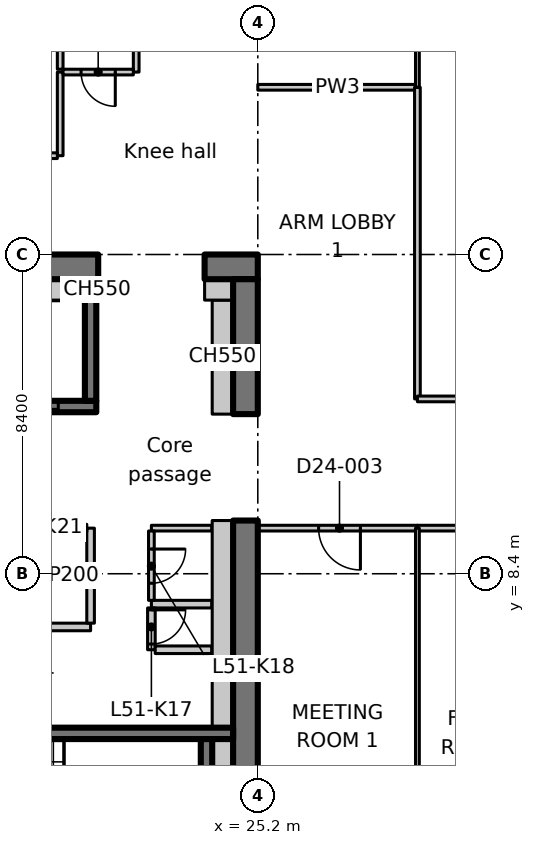
"""IFC4 building model, lengths in metres.
Left out: names, types, materials, properties, quantities, classifications, styles, units other than length and angle.
Written with IfcOpenShell. Run it as: python <this file> out.ifc"""

import sys

from ifc_helpers import new_model, si_unit, direction, frame, frame_2d, origin, place, context, subcontext, project, spatial, polyline, rectangle, outline, extrude, element, fill, save


model = new_model("IFC4")
c1 = context("Model", 3, precision=1e-05, world=origin(), true_north=direction((0.0, 1.0)))
c2 = subcontext(c1, "Body", "Model", "MODEL_VIEW")
j1 = project(units=[si_unit("LENGTHUNIT", "METRE"), si_unit("PLANEANGLEUNIT", "RADIAN")], contexts=[c1])
p1 = place(None, origin())
s1 = spatial("IfcSite", under=j1, at=p1, CompositionType="ELEMENT")
p2 = place(p1, origin())
s2 = spatial("IfcBuilding", under=s1, at=p2, CompositionType="ELEMENT")
p3 = place(p2, frame((0.0, 0.0, 202.8)))
s3 = spatial("IfcBuildingStorey", under=s2, at=p3, CompositionType="ELEMENT", Elevation=202.8)
p4 = place(p3, frame((-1.1, 16.475, 0.0), z_axis=(0.0, 0.0, 1.0), x_axis=(1.0, 0.0, 0.0)))
e1 = element("IfcWall", 1, at=p4, inside=s3, PredefinedType="SHEAR", context=c2, shape_type="SweptSolid", body=[
    extrude(rectangle(XDim=22.1, YDim=0.65, at=frame_2d((11.05, 0.0))), origin(), (0.0, 0.0, 1.0), 3.3),
])
p5 = place(p4, frame((3.15, 0.0, 0.0)))
e2 = element("IfcOpeningElement", 2, at=p5, cuts=e1, PredefinedType="OPENING", context=c2, shape_type="SweptSolid", body=[
    extrude(rectangle(XDim=1.1, YDim=2.3, at=frame_2d((0.55, 1.15))), frame((0.0, 0.335, 0.0), z_axis=(0.0, -1.0, 0.0), x_axis=(1.0, 0.0, 0.0)), (0.0, 0.0, 1.0), 0.67),
])
p6 = place(p3, frame((23.8, 16.475, 0.0), z_axis=(0.0, 0.0, 1.0), x_axis=(1.0, 0.0, 0.0)))
e3 = element("IfcWall", 3, at=p6, inside=s3, PredefinedType="SHEAR", context=c2, shape_type="SweptSolid", body=[
    extrude(rectangle(XDim=1.4, YDim=0.65, at=frame_2d((0.7, 0.0))), origin(), (0.0, 0.0, 1.0), 3.3),
])
p7 = place(p3, frame((24.875, 0.65, 0.0), z_axis=(0.0, 0.0, 1.0), x_axis=(0.0, 1.0, 0.0)))
e4 = element("IfcWall", 4, at=p7, inside=s3, PredefinedType="SHEAR", context=c2, shape_type="SweptSolid", body=[
    extrude(rectangle(XDim=9.15, YDim=0.65, at=frame_2d((4.575, 0.0))), origin(), (0.0, 0.0, 1.0), 3.3),
])
p8 = place(p3, frame((24.875, 12.6, 0.0), z_axis=(0.0, 0.0, 1.0), x_axis=(0.0, 1.0, 0.0)))
e5 = element("IfcWall", 5, at=p8, inside=s3, PredefinedType="SHEAR", context=c2, shape_type="SweptSolid", body=[
    extrude(rectangle(XDim=3.55, YDim=0.65, at=frame_2d((1.775, 0.0))), origin(), (0.0, 0.0, 1.0), 3.3),
])
p9 = place(p3, frame((24.275, 12.6, 0.0), z_axis=(0.0, 0.0, 1.0), x_axis=(0.0, 1.0, 0.0)))
e6 = element("IfcWall", 6, at=p9, inside=s3, PredefinedType="PARTITIONING", context=c2, shape_type="SweptSolid", body=[
    extrude(rectangle(XDim=3.0, YDim=0.55, at=frame_2d((1.5, 0.0))), origin(), (0.0, 0.0, 1.0), 3.3),
])
p10 = place(p3, frame((23.8, 15.875, 0.0), z_axis=(0.0, 0.0, 1.0), x_axis=(1.0, 0.0, 0.0)))
e7 = element("IfcWall", 7, at=p10, inside=s3, PredefinedType="PARTITIONING", context=c2, shape_type="SweptSolid", body=[
    extrude(rectangle(XDim=0.75, YDim=0.55, at=frame_2d((0.375, 0.0))), origin(), (0.0, 0.0, 1.0), 3.3),
])
p11 = place(p3, frame((17.85, 12.8, 0.0), z_axis=(0.0, 0.0, 1.0), x_axis=(1.0, 0.0, 0.0)))
e8 = element("IfcWall", 8, at=p11, inside=s3, PredefinedType="SHEAR", context=c2, shape_type="SweptSolid", body=[
    extrude(rectangle(XDim=3.1, YDim=0.3, at=frame_2d((1.55, 0.0))), origin(), (0.0, 0.0, 1.0), 3.3),
])
p12 = place(p11, frame((1.0, 0.0, 0.0)))
e9 = element("IfcOpeningElement", 9, at=p12, cuts=e8, PredefinedType="OPENING", context=c2, shape_type="SweptSolid", body=[
    extrude(rectangle(XDim=1.1, YDim=2.3, at=frame_2d((0.55, 1.15))), frame((0.0, 0.16, 0.0), z_axis=(0.0, -1.0, 0.0), x_axis=(1.0, 0.0, 0.0)), (0.0, 0.0, 1.0), 0.32),
])
p13 = place(p3, frame((20.8, 12.95, 0.0), z_axis=(0.0, 0.0, 1.0), x_axis=(0.0, 1.0, 0.0)))
e10 = element("IfcWall", 10, at=p13, inside=s3, PredefinedType="SHEAR", context=c2, shape_type="SweptSolid", body=[
    extrude(rectangle(XDim=3.2, YDim=0.3, at=frame_2d((1.6, 0.0))), origin(), (0.0, 0.0, 1.0), 3.3),
])
p14 = place(p3, frame((15.8, 4.2, 0.0), z_axis=(0.0, 0.0, 1.0), x_axis=(1.0, 0.0, 0.0)))
e11 = element("IfcWall", 11, at=p14, inside=s3, PredefinedType="SHEAR", context=c2, shape_type="SweptSolid", body=[
    extrude(rectangle(XDim=8.75, YDim=0.3, at=frame_2d((4.375, 0.0))), origin(), (0.0, 0.0, 1.0), 3.3),
])
p15 = place(p14, frame((0.4, 0.0, 0.0)))
e12 = element("IfcOpeningElement", 12, at=p15, cuts=e11, PredefinedType="OPENING", context=c2, shape_type="SweptSolid", body=[
    extrude(rectangle(XDim=1.0, YDim=2.1, at=frame_2d((0.5, 1.05))), frame((0.0, 0.16, 0.0), z_axis=(0.0, -1.0, 0.0), x_axis=(1.0, 0.0, 0.0)), (0.0, 0.0, 1.0), 0.32),
])
p16 = place(p3, frame((23.85, 1.5, 0.0), z_axis=(0.0, 0.0, 1.0), x_axis=(0.0, 1.0, 0.0)))
e13 = element("IfcWall", 13, at=p16, inside=s3, PredefinedType="SHEAR", context=c2, shape_type="SweptSolid", body=[
    extrude(rectangle(XDim=2.55, YDim=0.3, at=frame_2d((1.275, 0.0))), origin(), (0.0, 0.0, 1.0), 3.3),
])
p17 = place(p3, frame((12.4, 7.0, 0.0), z_axis=(0.0, 0.0, 1.0), x_axis=(1.0, 0.0, 0.0)))
e14 = element("IfcWall", 14, at=p17, inside=s3, PredefinedType="PARTITIONING", context=c2, shape_type="SweptSolid", body=[
    extrude(rectangle(XDim=8.4, YDim=0.2, at=frame_2d((4.2, 0.0))), origin(), (0.0, 0.0, 1.0), 3.3),
])
p18 = place(p3, frame((20.8, 7.1, 0.0), z_axis=(0.0, 0.0, 1.0), x_axis=(0.0, 1.0, 0.0)))
e15 = element("IfcWall", 15, at=p18, inside=s3, PredefinedType="PARTITIONING", context=c2, shape_type="SweptSolid", body=[
    extrude(rectangle(XDim=2.5, YDim=0.2, at=frame_2d((1.25, 0.0))), origin(), (0.0, 0.0, 1.0), 3.3),
])
p19 = place(p3, frame((20.7, 9.6, 0.0), z_axis=(0.0, 0.0, 1.0), x_axis=(-1.0, 0.0, 0.0)))
e16 = element("IfcWall", 16, at=p19, inside=s3, PredefinedType="PARTITIONING", context=c2, shape_type="SweptSolid", body=[
    extrude(rectangle(XDim=8.3, YDim=0.2, at=frame_2d((4.15, 0.0))), origin(), (0.0, 0.0, 1.0), 3.3),
])
p20 = place(p19, frame((3.65, 0.0, 0.0)))
e17 = element("IfcOpeningElement", 17, at=p20, cuts=e16, PredefinedType="OPENING", context=c2, shape_type="SweptSolid", body=[
    extrude(rectangle(XDim=0.9, YDim=2.1, at=frame_2d((0.45, 1.05))), frame((0.0, 0.11, 0.0), z_axis=(0.0, -1.0, 0.0), x_axis=(1.0, 0.0, 0.0)), (0.0, 0.0, 1.0), 0.22),
])
p21 = place(p3, frame((23.988, 7.6, 0.0), z_axis=(0.0, 0.0, 1.0), x_axis=(-1.0, 0.0, 0.0)))
e18 = element("IfcWall", 18, at=p21, inside=s3, PredefinedType="PARTITIONING", context=c2, shape_type="SweptSolid", body=[
    extrude(rectangle(XDim=1.588, YDim=0.2, at=frame_2d((0.794, 0.0))), origin(), (0.0, 0.0, 1.0), 3.3),
])
p22 = place(p3, frame((22.4, 7.5, 0.0), z_axis=(0.0, 0.0, 1.0), x_axis=(0.0, -1.0, 0.0)))
e19 = element("IfcWall", 19, at=p22, inside=s3, PredefinedType="PARTITIONING", context=c2, shape_type="SweptSolid", body=[
    extrude(rectangle(XDim=1.1, YDim=0.2, at=frame_2d((0.55, 0.0))), origin(), (0.0, 0.0, 1.0), 3.3),
])
p23 = place(p22, frame((0.05, 0.0, 0.0)))
e20 = element("IfcOpeningElement", 20, at=p23, cuts=e19, PredefinedType="OPENING", context=c2, shape_type="SweptSolid", body=[
    extrude(rectangle(XDim=0.9, YDim=2.1, at=frame_2d((0.45, 1.05))), frame((0.0, 0.11, 0.0), z_axis=(0.0, -1.0, 0.0), x_axis=(1.0, 0.0, 0.0)), (0.0, 0.0, 1.0), 0.22),
])
p24 = place(p3, frame((22.5, 6.4, 0.0), z_axis=(0.0, 0.0, 1.0), x_axis=(1.0, 0.0, 0.0)))
e21 = element("IfcWall", 21, at=p24, inside=s3, PredefinedType="PARTITIONING", context=c2, shape_type="SweptSolid", body=[
    extrude(rectangle(XDim=1.488, YDim=0.2, at=frame_2d((0.744, 0.0))), origin(), (0.0, 0.0, 1.0), 3.3),
])
p25 = place(p3, frame((20.0, 21.6, 0.0), z_axis=(0.0, 0.0, 1.0), x_axis=(0.0, -1.0, 0.0)))
e22 = element("IfcWall", 22, at=p25, inside=s3, PredefinedType="PARTITIONING", context=c2, shape_type="SweptSolid", body=[
    extrude(rectangle(XDim=2.2, YDim=0.15, at=frame_2d((1.1, 0.0))), origin(), (0.0, 0.0, 1.0), 3.3),
])
p26 = place(p3, frame((19.925, 19.4, 0.0), z_axis=(0.0, 0.0, 1.0), x_axis=(-1.0, 0.0, 0.0)))
e23 = element("IfcWall", 23, at=p26, inside=s3, PredefinedType="PARTITIONING", context=c2, shape_type="SweptSolid", body=[
    extrude(rectangle(XDim=3.725, YDim=0.15, at=frame_2d((1.863, 0.0))), origin(), (0.0, 0.0, 1.0), 3.3),
])
p27 = place(p26, frame((1.325, 0.0, 0.0)))
e24 = element("IfcOpeningElement", 24, at=p27, cuts=e23, PredefinedType="OPENING", context=c2, shape_type="SweptSolid", body=[
    extrude(rectangle(XDim=1.0, YDim=2.1, at=frame_2d((0.5, 1.05))), frame((0.0, 0.085, 0.0), z_axis=(0.0, -1.0, 0.0), x_axis=(1.0, 0.0, 0.0)), (0.0, 0.0, 1.0), 0.17),
])
p28 = place(p3, frame((22.0, 23.925, 0.0), z_axis=(0.0, 0.0, 1.0), x_axis=(0.0, -1.0, 0.0)))
e25 = element("IfcWall", 25, at=p28, inside=s3, PredefinedType="PARTITIONING", context=c2, shape_type="SweptSolid", body=[
    extrude(rectangle(XDim=2.325, YDim=0.15, at=frame_2d((1.163, 0.0))), origin(), (0.0, 0.0, 1.0), 3.3),
])
p29 = place(p3, frame((21.925, 21.6, 0.0), z_axis=(0.0, 0.0, 1.0), x_axis=(-1.0, 0.0, 0.0)))
e26 = element("IfcWall", 26, at=p29, inside=s3, PredefinedType="PARTITIONING", context=c2, shape_type="SweptSolid", body=[
    extrude(rectangle(XDim=1.85, YDim=0.15, at=frame_2d((0.925, 0.0))), origin(), (0.0, 0.0, 1.0), 3.3),
])
p30 = place(p29, frame((0.475, 0.0, 0.0)))
e27 = element("IfcOpeningElement", 27, at=p30, cuts=e26, PredefinedType="OPENING", context=c2, shape_type="SweptSolid", body=[
    extrude(rectangle(XDim=0.9, YDim=2.1, at=frame_2d((0.45, 1.05))), frame((0.0, 0.085, 0.0), z_axis=(0.0, -1.0, 0.0), x_axis=(1.0, 0.0, 0.0)), (0.0, 0.0, 1.0), 0.17),
])
p31 = place(p3, frame((20.0, 21.675, 0.0), z_axis=(0.0, 0.0, 1.0), x_axis=(0.0, 1.0, 0.0)))
e28 = element("IfcWall", 28, at=p31, inside=s3, PredefinedType="PARTITIONING", context=c2, shape_type="SweptSolid", body=[
    extrude(rectangle(XDim=2.15, YDim=0.15, at=frame_2d((1.075, 0.0))), origin(), (0.0, 0.0, 1.0), 3.3),
])
p32 = place(p3, frame((23.988, 9.6, 0.0), z_axis=(0.0, 0.0, 1.0), x_axis=(-1.0, 0.0, 0.0)))
e29 = element("IfcWall", 29, at=p32, inside=s3, PredefinedType="PARTITIONING", context=c2, shape_type="SweptSolid", body=[
    extrude(rectangle(XDim=1.588, YDim=0.15, at=frame_2d((0.794, 0.0))), origin(), (0.0, 0.0, 1.0), 3.3),
])
p33 = place(p3, frame((22.4, 9.525, 0.0), z_axis=(0.0, 0.0, 1.0), x_axis=(0.0, -1.0, 0.0)))
e30 = element("IfcWall", 30, at=p33, inside=s3, PredefinedType="PARTITIONING", context=c2, shape_type="SweptSolid", body=[
    extrude(rectangle(XDim=1.825, YDim=0.15, at=frame_2d((0.913, 0.0))), origin(), (0.0, 0.0, 1.0), 3.3),
])
p34 = place(p33, frame((0.475, 0.0, 0.0)))
e31 = element("IfcOpeningElement", 31, at=p34, cuts=e30, PredefinedType="OPENING", context=c2, shape_type="SweptSolid", body=[
    extrude(rectangle(XDim=0.9, YDim=2.1, at=frame_2d((0.45, 1.05))), frame((0.0, 0.085, 0.0), z_axis=(0.0, -1.0, 0.0), x_axis=(1.0, 0.0, 0.0)), (0.0, 0.0, 1.0), 0.17),
])
p35 = place(p3, frame((18.15, 15.875, 0.0), z_axis=(0.0, 0.0, 1.0), x_axis=(1.0, 0.0, 0.0)))
e32 = element("IfcWall", 32, at=p35, inside=s3, PredefinedType="PARTITIONING", context=c2, shape_type="SweptSolid", body=[
    extrude(rectangle(XDim=2.5, YDim=0.55, at=frame_2d((1.25, 0.0))), origin(), (0.0, 0.0, 1.0), 3.3),
])
p36 = place(p3, frame((20.95, 15.875, 0.0), z_axis=(0.0, 0.0, 1.0), x_axis=(1.0, 0.0, 0.0)))
e33 = element("IfcWall", 33, at=p36, inside=s3, PredefinedType="PARTITIONING", context=c2, shape_type="SweptSolid", body=[
    extrude(rectangle(XDim=0.05, YDim=0.55, at=frame_2d((0.025, 0.0))), origin(), (0.0, 0.0, 1.0), 3.3),
])
p37 = place(p3, frame((24.275, 1.5, 0.0), z_axis=(0.0, 0.0, 1.0), x_axis=(0.0, 1.0, 0.0)))
e34 = element("IfcWall", 34, at=p37, inside=s3, PredefinedType="PARTITIONING", context=c2, shape_type="SweptSolid", body=[
    extrude(rectangle(XDim=2.55, YDim=0.55, at=frame_2d((1.275, 0.0))), origin(), (0.0, 0.0, 1.0), 3.3),
])
p38 = place(p3, frame((24.275, 4.35, 0.0), z_axis=(0.0, 0.0, 1.0), x_axis=(0.0, 1.0, 0.0)))
e35 = element("IfcWall", 35, at=p38, inside=s3, PredefinedType="PARTITIONING", context=c2, shape_type="SweptSolid", body=[
    extrude(rectangle(XDim=5.45, YDim=0.55, at=frame_2d((2.725, 0.0))), origin(), (0.0, 0.0, 1.0), 3.3),
])
p39 = place(p3, frame((25.2, 21.2, 0.0), z_axis=(0.0, 0.0, 1.0), x_axis=(1.0, 0.0, 0.0)))
e36 = element("IfcWall", 36, at=p39, inside=s3, PredefinedType="PARTITIONING", context=c2, shape_type="SweptSolid", body=[
    extrude(rectangle(XDim=4.2, YDim=0.15, at=frame_2d((2.1, 0.0))), origin(), (0.0, 0.0, 1.0), 3.28),
])
p40 = place(p3, frame((29.4, 9.6, 0.0), z_axis=(0.0, 0.0, 1.0), x_axis=(-1.0, 0.0, 0.0)))
e37 = element("IfcWall", 37, at=p40, inside=s3, PredefinedType="PARTITIONING", context=c2, shape_type="SweptSolid", body=[
    extrude(rectangle(XDim=4.2, YDim=0.15, at=frame_2d((2.1, 0.0))), origin(), (0.0, 0.0, 1.0), 3.28),
])
p41 = place(p40, frame((1.5, 0.0, 0.0)))
e38 = element("IfcOpeningElement", 38, at=p41, cuts=e37, PredefinedType="OPENING", context=c2, shape_type="SweptSolid", body=[
    extrude(rectangle(XDim=1.1, YDim=2.1, at=frame_2d((0.55, 1.05))), frame((0.0, 0.085, 0.0), z_axis=(0.0, -1.0, 0.0), x_axis=(1.0, 0.0, 0.0)), (0.0, 0.0, 1.0), 0.17),
])
p42 = place(p3, frame((29.4, 21.2, 0.0), z_axis=(0.0, 0.0, 1.0), x_axis=(0.0, -1.0, 0.0)))
e39 = element("IfcWall", 39, at=p42, inside=s3, PredefinedType="PARTITIONING", context=c2, shape_type="SweptSolid", body=[
    extrude(rectangle(XDim=8.2, YDim=0.15, at=frame_2d((4.1, 0.0))), origin(), (0.0, 0.0, 1.0), 3.28),
])
p43 = place(p3, frame((29.4, 27.511, 0.0), z_axis=(0.0, 0.0, 1.0), x_axis=(0.0, -1.0, 0.0)))
e40 = element("IfcWall", 40, at=p43, inside=s3, PredefinedType="PARTITIONING", context=c2, shape_type="SweptSolid", body=[
    extrude(outline(polyline([(0.0, 0.0), (6.311, 0.0), (6.311, 3.28), (2.761, 3.28), (2.759, 2.93), (1.863, 2.93), (1.861, 3.28), (0.236, 3.28), (0.0, 3.28), (0.0, 0.0)])), frame((0.0, 0.05, 0.0), z_axis=(0.0, -1.0, 0.0), x_axis=(1.0, 0.0, 0.0)), (0.0, 0.0, 1.0), 0.1),
])
for number, where, z_axis, x_axis in (
    (41, (33.6, 9.6, 0.0), (0.0, 0.0, 1.0), (-1.0, 0.0, 0.0)),
    (42, (29.4, 13.0, 0.0), (0.0, 0.0, 1.0), (1.0, 0.0, 0.0)),
):
    element("IfcWall", number, at=place(p3, frame(where, z_axis=z_axis, x_axis=x_axis)), inside=s3, PredefinedType="PARTITIONING", context=c2, shape_type="SweptSolid", body=[
        extrude(rectangle(XDim=4.2, YDim=0.15, at=frame_2d((2.1, 0.0))), origin(), (0.0, 0.0, 1.0), 3.28),
    ])
p44 = place(p3, frame((29.4, 9.6, 0.0), z_axis=(0.0, 0.0, 1.0), x_axis=(0.0, -1.0, 0.0)))
e43 = element("IfcWall", 43, at=p44, inside=s3, PredefinedType="PARTITIONING", context=c2, shape_type="SweptSolid", body=[
    extrude(outline(polyline([(0.0, 0.0), (10.774, 0.0), (10.774, 3.28), (10.7, 3.28), (10.05, 3.28), (10.048, 2.93), (9.152, 2.93), (9.15, 3.28), (0.0, 3.28), (0.0, 0.0)])), frame((0.0, 0.05, 0.0), z_axis=(0.0, -1.0, 0.0), x_axis=(1.0, 0.0, 0.0)), (0.0, 0.0, 1.0), 0.1),
])
p45 = place(p12, origin())
e44 = element("IfcDoor", 44, at=p45, inside=s3, OperationType="SLIDING_TO_LEFT", PredefinedType="DOOR", context=c2, shape_type="SweptSolid", body=[
    extrude(rectangle(XDim=1.1, YDim=2.3, at=frame_2d((0.55, 1.15))), frame((0.0, 0.025, 0.0), z_axis=(0.0, -1.0, 0.0), x_axis=(1.0, 0.0, 0.0)), (0.0, 0.0, 1.0), 0.05),
])
fill(e9, e44)
p46 = place(p23, origin())
e45 = element("IfcDoor", 45, at=p46, inside=s3, OperationType="SINGLE_SWING_LEFT", PredefinedType="DOOR", context=c2, shape_type="SweptSolid", body=[
    extrude(rectangle(XDim=0.9, YDim=2.1, at=frame_2d((0.45, 1.05))), frame((0.0, 0.025, 0.0), z_axis=(0.0, -1.0, 0.0), x_axis=(1.0, 0.0, 0.0)), (0.0, 0.0, 1.0), 0.05),
])
fill(e20, e45)
p47 = place(p34, origin())
e46 = element("IfcDoor", 46, at=p47, inside=s3, OperationType="SINGLE_SWING_RIGHT", PredefinedType="DOOR", context=c2, shape_type="SweptSolid", body=[
    extrude(rectangle(XDim=0.9, YDim=2.1, at=frame_2d((0.45, 1.05))), frame((0.0, 0.025, 0.0), z_axis=(0.0, -1.0, 0.0), x_axis=(1.0, 0.0, 0.0)), (0.0, 0.0, 1.0), 0.05),
])
fill(e31, e46)
p48 = place(p30, origin())
e47 = element("IfcDoor", 47, at=p48, inside=s3, OperationType="SINGLE_SWING_LEFT", PredefinedType="DOOR", context=c2, shape_type="SweptSolid", body=[
    extrude(rectangle(XDim=0.9, YDim=2.1, at=frame_2d((0.45, 1.05))), frame((0.0, 0.025, 0.0), z_axis=(0.0, -1.0, 0.0), x_axis=(1.0, 0.0, 0.0)), (0.0, 0.0, 1.0), 0.05),
])
fill(e27, e47)
p49 = place(p41, origin())
e48 = element("IfcDoor", 48, at=p49, inside=s3, OperationType="SINGLE_SWING_LEFT", PredefinedType="DOOR", context=c2, shape_type="SweptSolid", body=[
    extrude(rectangle(XDim=1.1, YDim=2.1, at=frame_2d((0.55, 1.05))), frame((0.0, 0.025, 0.0), z_axis=(0.0, -1.0, 0.0), x_axis=(1.0, 0.0, 0.0)), (0.0, 0.0, 1.0), 0.05),
])
fill(e38, e48)
save(model, sys.argv[1])
